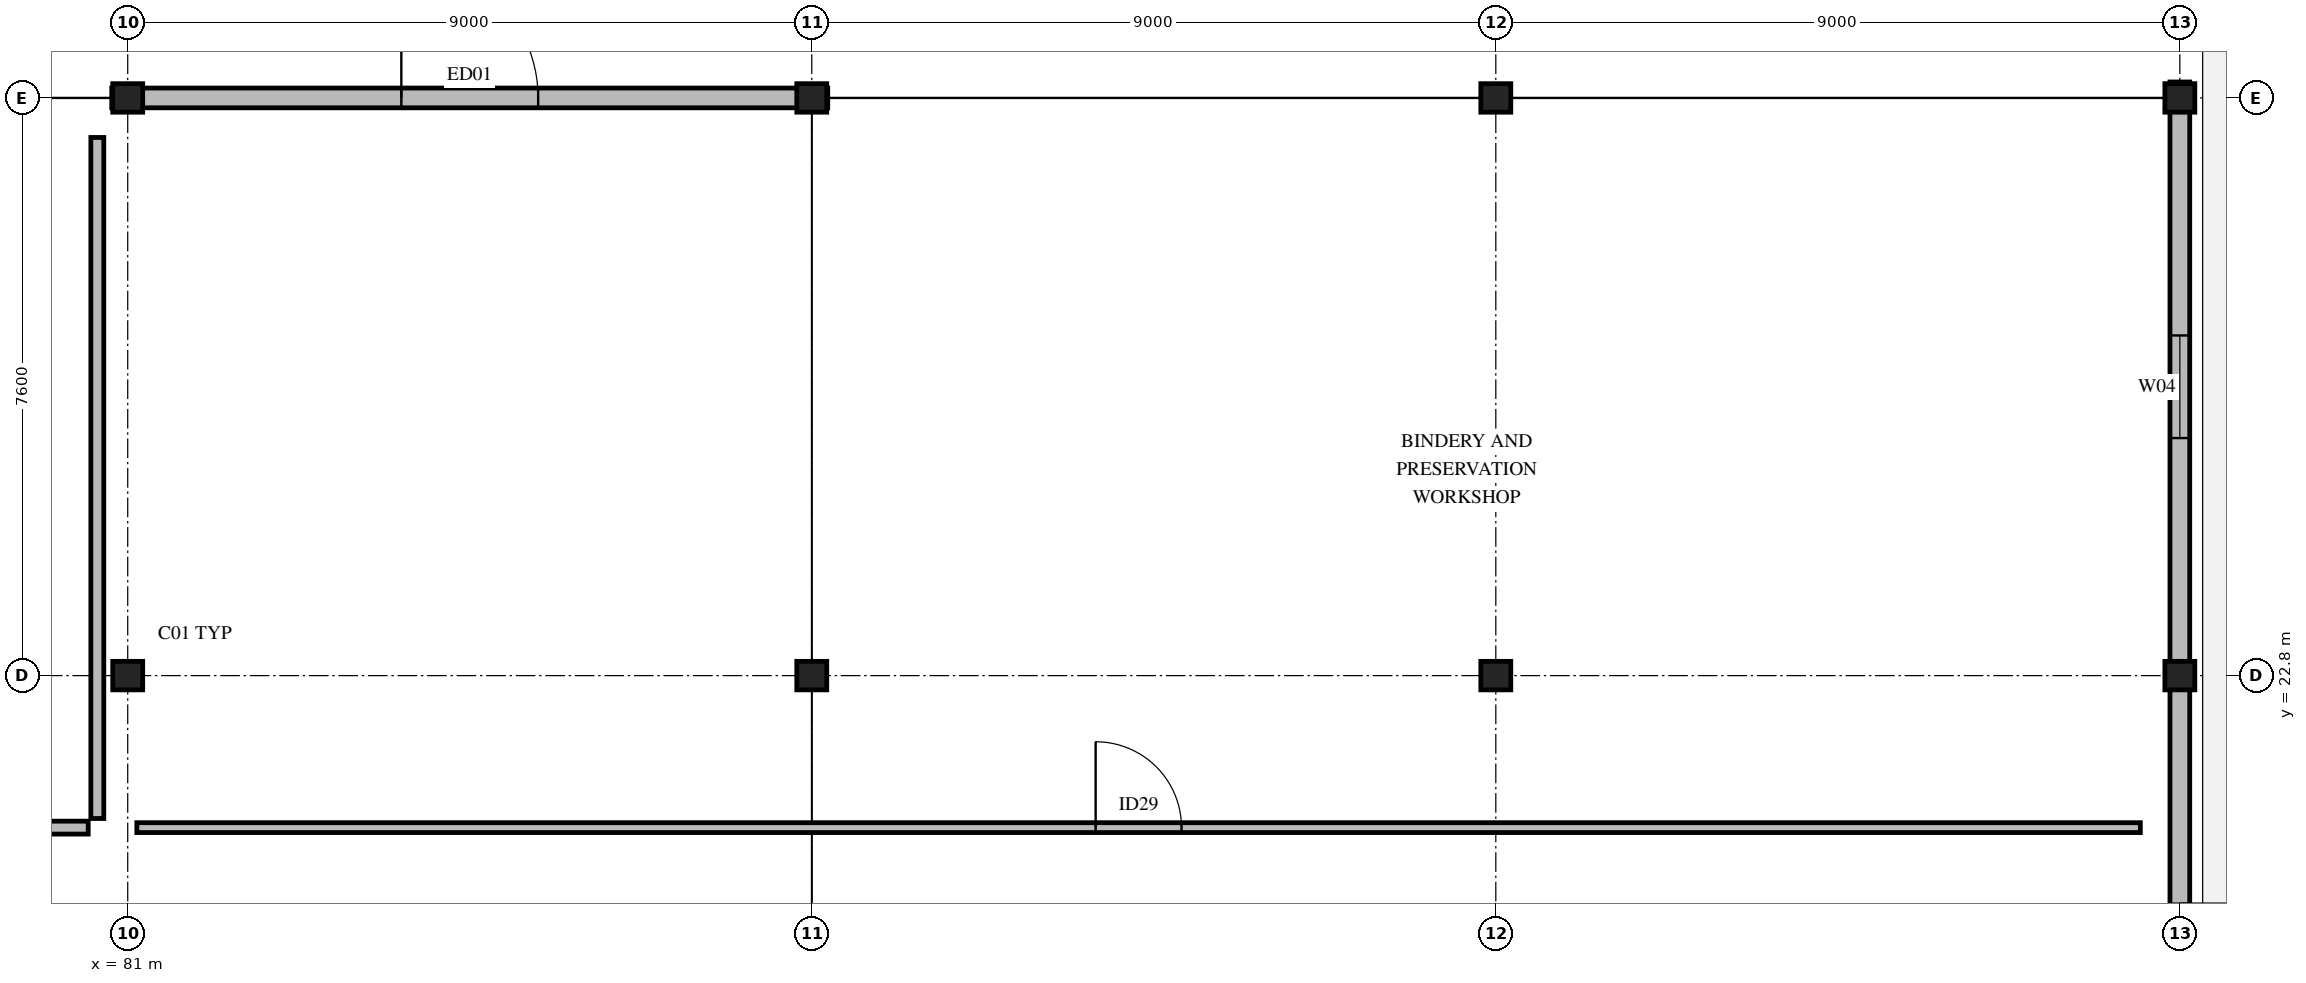
"""IFC4 building model, lengths in metres.
Left out: names, types, materials, properties, quantities, classifications, styles, units other than length and angle.
Written with IfcOpenShell. Run it as: python <this file> out.ifc"""

import sys

from ifc_helpers import new_model, si_unit, direction, frame, frame_2d, origin, origin_2d, place, context, subcontext, project, spatial, rectangle, i_section, extrude, element, fill, save


model = new_model("IFC4")
c1 = context("Model", 3, precision=1e-05, world=origin(), true_north=direction((0.0, 1.0)))
c2 = subcontext(c1, "Body", "Model", "MODEL_VIEW")
j1 = project(units=[si_unit("LENGTHUNIT", "METRE"), si_unit("PLANEANGLEUNIT", "RADIAN")], contexts=[c1])
p1 = place(None, origin())
s1 = spatial("IfcSite", under=j1, at=p1, CompositionType="ELEMENT")
p2 = place(p1, origin())
s2 = spatial("IfcBuilding", under=s1, at=p2, CompositionType="ELEMENT")
p3 = place(p2, origin())
s3 = spatial("IfcBuildingStorey", under=s2, at=p3, CompositionType="ELEMENT", Elevation=0.0)
for number, where, z_axis, x_axis in (
    (1, (81.0, 22.8, 0.0), (0.0, 0.0, 1.0), (1.0, 0.0, 0.0)),
    (2, (81.0, 30.4, 0.0), (0.0, 0.0, 1.0), (1.0, 0.0, 0.0)),
    (3, (90.0, 22.8, 0.0), (0.0, 0.0, 1.0), (1.0, 0.0, 0.0)),
    (4, (90.0, 30.4, 0.0), (0.0, 0.0, 1.0), (1.0, 0.0, 0.0)),
    (5, (99.0, 22.8, 0.0), (0.0, 0.0, 1.0), (1.0, 0.0, 0.0)),
    (6, (99.0, 30.4, 0.0), (0.0, 0.0, 1.0), (1.0, 0.0, 0.0)),
    (7, (108.0, 22.8, 0.0), (0.0, 0.0, 1.0), (1.0, 0.0, 0.0)),
    (8, (108.0, 30.4, 0.0), (0.0, 0.0, 1.0), (1.0, 0.0, 0.0)),
):
    element("IfcColumn", number, at=place(p3, frame(where, z_axis=z_axis, x_axis=x_axis)), inside=s3, PredefinedType="COLUMN", context=c2, shape_type="SweptSolid", body=[
        extrude(i_section(OverallWidth=0.394, OverallDepth=0.375, WebThickness=0.017, FlangeThickness=0.028, FilletRadius=0.018, at=origin_2d()), origin(), (0.0, 0.0, 1.0), 5.04),
    ])
p4 = place(p3, frame((80.79, 30.4, 0.0), z_axis=(0.0, 0.0, 1.0), x_axis=(1.0, 0.0, 0.0)))
e9 = element("IfcWall", 9, at=p4, inside=s3, PredefinedType="STANDARD", context=c2, shape_type="SweptSolid", body=[
    extrude(rectangle(XDim=9.42, YDim=0.26, at=frame_2d((4.71, 0.0))), origin(), (0.0, 0.0, 1.0), 4.331),
])
p5 = place(p4, frame((3.81, 0.0, 0.0)))
e10 = element("IfcOpeningElement", 10, at=p5, cuts=e9, PredefinedType="OPENING", context=c2, shape_type="SweptSolid", body=[
    extrude(rectangle(XDim=1.8, YDim=2.25, at=frame_2d((0.9, 1.125))), frame((0.0, 0.14, 0.0), z_axis=(0.0, -1.0, 0.0), x_axis=(1.0, 0.0, 0.0)), (0.0, 0.0, 1.0), 0.28),
])
p6 = place(p3, frame((108.0, 15.2, 0.0), z_axis=(0.0, 0.0, 1.0), x_axis=(0.0, 1.0, 0.0)))
e11 = element("IfcWall", 11, at=p6, inside=s3, PredefinedType="STANDARD", context=c2, shape_type="SweptSolid", body=[
    extrude(rectangle(XDim=7.6, YDim=0.26, at=frame_2d((3.8, 0.0))), origin(), (0.0, 0.0, 1.0), 4.319),
])
p7 = place(p6, frame((3.0, 0.0, 0.0)))
e12 = element("IfcOpeningElement", 12, at=p7, cuts=e11, PredefinedType="OPENING", context=c2, shape_type="SweptSolid", body=[
    extrude(rectangle(XDim=1.6, YDim=2.2, at=frame_2d((0.8, 1.1))), frame((0.0, 0.14, 0.0), z_axis=(0.0, -1.0, 0.0), x_axis=(1.0, 0.0, 0.0)), (0.0, 0.0, 1.0), 0.28),
])
p8 = place(p3, frame((108.0, 22.8, 0.0), z_axis=(0.0, 0.0, 1.0), x_axis=(0.0, 1.0, 0.0)))
e13 = element("IfcWall", 13, at=p8, inside=s3, PredefinedType="STANDARD", context=c2, shape_type="SweptSolid", body=[
    extrude(rectangle(XDim=7.81, YDim=0.26, at=frame_2d((3.905, 0.0))), origin(), (0.0, 0.0, 1.0), 4.319),
])
p9 = place(p8, frame((3.125, 0.0, 0.85)))
e14 = element("IfcOpeningElement", 14, at=p9, cuts=e13, PredefinedType="OPENING", context=c2, shape_type="SweptSolid", body=[
    extrude(rectangle(XDim=1.35, YDim=1.2, at=frame_2d((0.675, 0.6))), frame((0.0, 0.14, 0.0), z_axis=(0.0, -1.0, 0.0), x_axis=(1.0, 0.0, 0.0)), (0.0, 0.0, 1.0), 0.28),
])
p10 = place(p3, frame((54.52, 20.8, 0.0), z_axis=(0.0, 0.0, 1.0), x_axis=(1.0, 0.0, 0.0)))
e15 = element("IfcWall", 15, at=p10, inside=s3, PredefinedType="PARTITIONING", context=c2, shape_type="SweptSolid", body=[
    extrude(rectangle(XDim=25.96, YDim=0.17, at=frame_2d((12.98, 0.0))), origin(), (0.0, 0.0, 1.0), 4.76),
])
p11 = place(p10, frame((12.355, 0.0, 0.0)))
e16 = element("IfcOpeningElement", 16, at=p11, cuts=e15, PredefinedType="OPENING", context=c2, shape_type="SweptSolid", body=[
    extrude(rectangle(XDim=1.25, YDim=2.18, at=frame_2d((0.625, 1.09))), frame((0.0, 0.095, 0.0), z_axis=(0.0, -1.0, 0.0), x_axis=(1.0, 0.0, 0.0)), (0.0, 0.0, 1.0), 0.19),
])
p12 = place(p3, frame((80.6, 20.92, 0.0), z_axis=(0.0, 0.0, 1.0), x_axis=(0.0, 1.0, 0.0)))
e17 = element("IfcWall", 17, at=p12, inside=s3, PredefinedType="PARTITIONING", context=c2, shape_type="SweptSolid", body=[
    extrude(rectangle(XDim=8.96, YDim=0.17, at=frame_2d((4.48, 0.0))), origin(), (0.0, 0.0, 1.0), 4.76),
])
p13 = place(p3, frame((81.12, 20.8, 0.0), z_axis=(0.0, 0.0, 1.0), x_axis=(1.0, 0.0, 0.0)))
e18 = element("IfcWall", 18, at=p13, inside=s3, PredefinedType="PARTITIONING", context=c2, shape_type="SweptSolid", body=[
    extrude(rectangle(XDim=26.36, YDim=0.13, at=frame_2d((13.18, 0.0))), origin(), (0.0, 0.0, 1.0), 4.76),
])
p14 = place(p13, frame((12.615, 0.0, 0.0)))
e19 = element("IfcOpeningElement", 19, at=p14, cuts=e18, PredefinedType="OPENING", context=c2, shape_type="SweptSolid", body=[
    extrude(rectangle(XDim=1.13, YDim=2.15, at=frame_2d((0.565, 1.075))), frame((0.0, 0.075, 0.0), z_axis=(0.0, -1.0, 0.0), x_axis=(1.0, 0.0, 0.0)), (0.0, 0.0, 1.0), 0.15),
])
p15 = place(p5, origin())
e20 = element("IfcDoor", 20, at=p15, inside=s3, OperationType="SINGLE_SWING_LEFT", PredefinedType="DOOR", context=c2, shape_type="SweptSolid", body=[
    extrude(rectangle(XDim=1.8, YDim=2.25, at=frame_2d((0.9, 1.125))), frame((0.0, 0.025, 0.0), z_axis=(0.0, -1.0, 0.0), x_axis=(1.0, 0.0, 0.0)), (0.0, 0.0, 1.0), 0.05),
])
fill(e10, e20)
p16 = place(p9, origin())
e21 = element("IfcWindow", 21, at=p16, inside=s3, PartitioningType="SINGLE_PANEL", PredefinedType="WINDOW", context=c2, shape_type="SweptSolid", body=[
    extrude(rectangle(XDim=1.35, YDim=1.2, at=frame_2d((0.675, 0.6))), frame((0.0, 0.03, 0.0), z_axis=(0.0, -1.0, 0.0), x_axis=(1.0, 0.0, 0.0)), (0.0, 0.0, 1.0), 0.06),
])
fill(e14, e21)
p17 = place(p14, origin())
e22 = element("IfcDoor", 22, at=p17, inside=s3, OperationType="SINGLE_SWING_LEFT", PredefinedType="DOOR", context=c2, shape_type="SweptSolid", body=[
    extrude(rectangle(XDim=1.13, YDim=2.15, at=frame_2d((0.565, 1.075))), frame((0.0, 0.025, 0.0), z_axis=(0.0, -1.0, 0.0), x_axis=(1.0, 0.0, 0.0)), (0.0, 0.0, 1.0), 0.05),
])
fill(e19, e22)
save(model, sys.argv[1])
